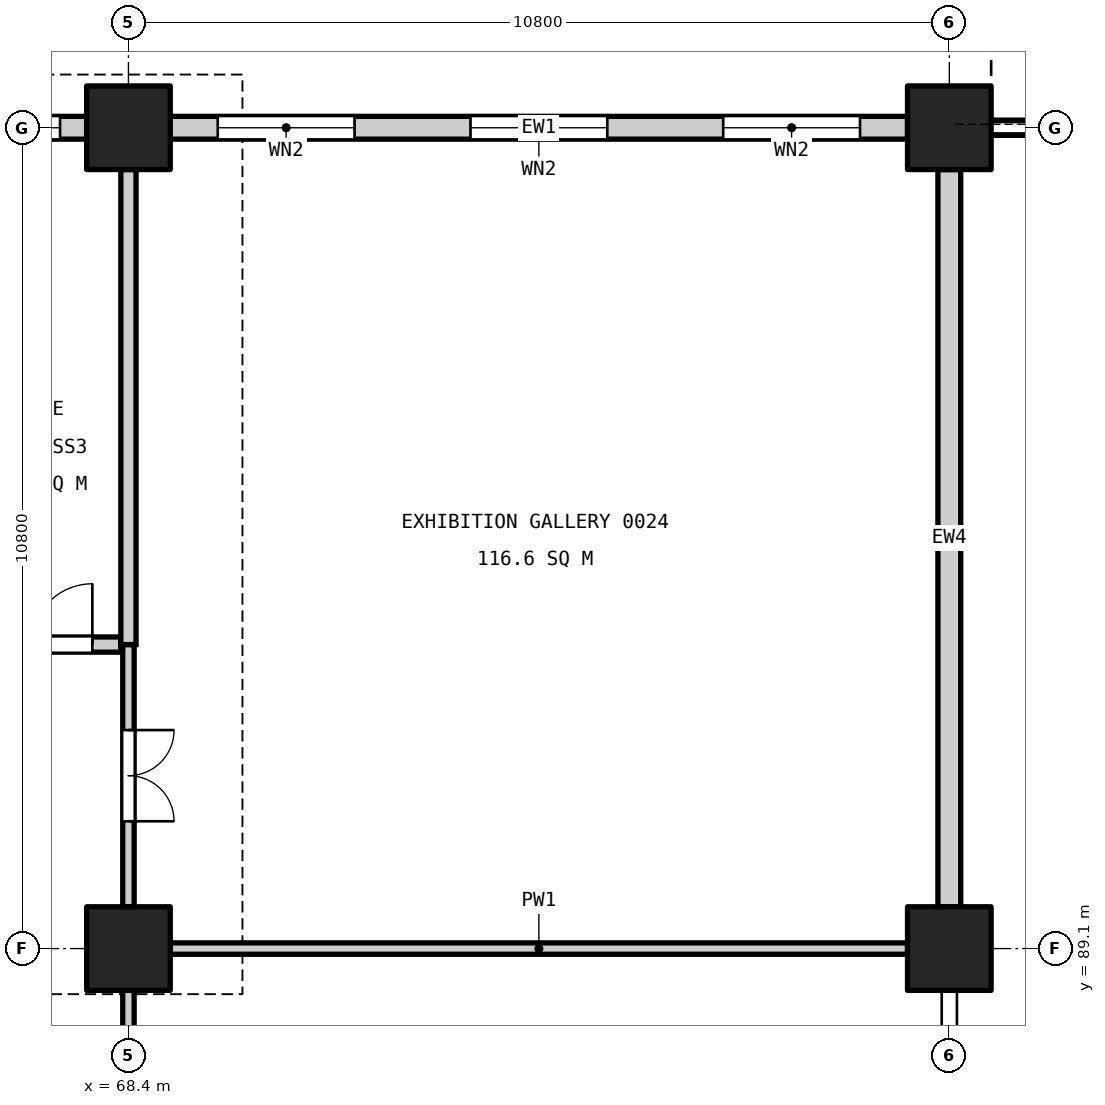
"""IFC4 building model, lengths in metres.
Left out: names, types, materials, properties, quantities, classifications, styles, units other than length and angle.
Written with IfcOpenShell. Run it as: python <this file> out.ifc"""

import sys

from ifc_helpers import new_model, si_unit, direction, frame, frame_2d, origin, origin_2d, place, context, subcontext, project, spatial, rectangle, extrude, element, fill, save


model = new_model("IFC4")
c1 = context("Model", 3, precision=1e-05, world=origin(), true_north=direction((0.0, 1.0)))
c2 = subcontext(c1, "Body", "Model", "MODEL_VIEW")
j1 = project(units=[si_unit("LENGTHUNIT", "METRE"), si_unit("PLANEANGLEUNIT", "RADIAN")], contexts=[c1])
p1 = place(None, origin())
s1 = spatial("IfcSite", under=j1, at=p1, CompositionType="ELEMENT")
p2 = place(p1, origin())
s2 = spatial("IfcBuilding", under=s1, at=p2, CompositionType="ELEMENT")
p3 = place(p2, origin())
s3 = spatial("IfcBuildingStorey", under=s2, at=p3, CompositionType="ELEMENT", Elevation=0.0)
for number, where, z_axis, x_axis in (
    (1, (68.4, 89.1, 0.0), (0.0, 0.0, 1.0), (1.0, 0.0, 0.0)),
    (2, (68.4, 99.9, 0.0), (0.0, 0.0, 1.0), (1.0, 0.0, 0.0)),
    (3, (79.2, 89.1, 0.0), (0.0, 0.0, 1.0), (1.0, 0.0, 0.0)),
    (4, (79.2, 99.9, 0.0), (0.0, 0.0, 1.0), (1.0, 0.0, 0.0)),
):
    element("IfcColumn", number, at=place(p3, frame(where, z_axis=z_axis, x_axis=x_axis)), inside=s3, PredefinedType="COLUMN", context=c2, shape_type="SweptSolid", body=[
        extrude(rectangle(XDim=1.1, YDim=1.1, at=origin_2d()), origin(), (0.0, 0.0, 1.0), 6.0),
    ])
p4 = place(p3, frame((79.75, 99.9, 0.0), z_axis=(0.0, 0.0, 1.0), x_axis=(1.0, 0.0, 0.0)))
e5 = element("IfcWall", 5, at=p4, inside=s3, PredefinedType="SOLIDWALL", context=c2, shape_type="SweptSolid", body=[
    extrude(rectangle(XDim=20.5, YDim=0.2, at=frame_2d((10.25, 0.0))), origin(), (0.0, 0.0, 1.0), 2.6),
])
p5 = place(p4, frame((0.608, 0.0, 0.0)))
e6 = element("IfcOpeningElement", 6, at=p5, cuts=e5, PredefinedType="OPENING", context=c2, shape_type="SweptSolid", body=[
    extrude(rectangle(XDim=2.2, YDim=2.4, at=frame_2d((1.1, 1.2))), frame((0.0, 0.11, 0.0), z_axis=(0.0, -1.0, 0.0), x_axis=(1.0, 0.0, 0.0)), (0.0, 0.0, 1.0), 0.22),
])
p6 = place(p4, frame((4.025, 0.0, 0.0)))
e7 = element("IfcOpeningElement", 7, at=p6, cuts=e5, PredefinedType="OPENING", context=c2, shape_type="SweptSolid", body=[
    extrude(rectangle(XDim=2.2, YDim=2.4, at=frame_2d((1.1, 1.2))), frame((0.0, 0.11, 0.0), z_axis=(0.0, -1.0, 0.0), x_axis=(1.0, 0.0, 0.0)), (0.0, 0.0, 1.0), 0.22),
])
p7 = place(p4, frame((7.442, 0.0, 0.0)))
e8 = element("IfcOpeningElement", 8, at=p7, cuts=e5, PredefinedType="OPENING", context=c2, shape_type="SweptSolid", body=[
    extrude(rectangle(XDim=2.2, YDim=2.4, at=frame_2d((1.1, 1.2))), frame((0.0, 0.11, 0.0), z_axis=(0.0, -1.0, 0.0), x_axis=(1.0, 0.0, 0.0)), (0.0, 0.0, 1.0), 0.22),
])
p8 = place(p4, frame((10.858, 0.0, 0.0)))
e9 = element("IfcOpeningElement", 9, at=p8, cuts=e5, PredefinedType="OPENING", context=c2, shape_type="SweptSolid", body=[
    extrude(rectangle(XDim=2.2, YDim=2.4, at=frame_2d((1.1, 1.2))), frame((0.0, 0.11, 0.0), z_axis=(0.0, -1.0, 0.0), x_axis=(1.0, 0.0, 0.0)), (0.0, 0.0, 1.0), 0.22),
])
p9 = place(p4, frame((14.275, 0.0, 0.0)))
e10 = element("IfcOpeningElement", 10, at=p9, cuts=e5, PredefinedType="OPENING", context=c2, shape_type="SweptSolid", body=[
    extrude(rectangle(XDim=2.2, YDim=2.4, at=frame_2d((1.1, 1.2))), frame((0.0, 0.11, 0.0), z_axis=(0.0, -1.0, 0.0), x_axis=(1.0, 0.0, 0.0)), (0.0, 0.0, 1.0), 0.22),
])
p10 = place(p4, frame((17.692, 0.0, 0.0)))
e11 = element("IfcOpeningElement", 11, at=p10, cuts=e5, PredefinedType="OPENING", context=c2, shape_type="SweptSolid", body=[
    extrude(rectangle(XDim=2.2, YDim=2.4, at=frame_2d((1.1, 1.2))), frame((0.0, 0.11, 0.0), z_axis=(0.0, -1.0, 0.0), x_axis=(1.0, 0.0, 0.0)), (0.0, 0.0, 1.0), 0.22),
])
p11 = place(p3, frame((65.95, 99.9, 0.0), z_axis=(0.0, 0.0, 1.0), x_axis=(1.0, 0.0, 0.0)))
e12 = element("IfcWall", 12, at=p11, inside=s3, PredefinedType="STANDARD", context=c2, shape_type="SweptSolid", body=[
    extrude(rectangle(XDim=1.9, YDim=0.3, at=frame_2d((0.95, 0.0))), origin(), (0.0, 0.0, 1.0), 4.9),
])
p12 = place(p11, frame((0.35, 0.0, 0.9)))
e13 = element("IfcOpeningElement", 13, at=p12, cuts=e12, PredefinedType="OPENING", context=c2, shape_type="SweptSolid", body=[
    extrude(rectangle(XDim=1.2, YDim=2.4, at=frame_2d((0.6, 1.2))), frame((0.0, 0.16, 0.0), z_axis=(0.0, -1.0, 0.0), x_axis=(1.0, 0.0, 0.0)), (0.0, 0.0, 1.0), 0.32),
])
p13 = place(p3, frame((68.95, 99.9, 0.0), z_axis=(0.0, 0.0, 1.0), x_axis=(1.0, 0.0, 0.0)))
e14 = element("IfcWall", 14, at=p13, inside=s3, PredefinedType="STANDARD", context=c2, shape_type="SweptSolid", body=[
    extrude(rectangle(XDim=9.7, YDim=0.3, at=frame_2d((4.85, 0.0))), origin(), (0.0, 0.0, 1.0), 4.9),
])
p14 = place(p13, frame((0.625, 0.0, 0.9)))
e15 = element("IfcOpeningElement", 15, at=p14, cuts=e14, PredefinedType="OPENING", context=c2, shape_type="SweptSolid", body=[
    extrude(rectangle(XDim=1.8, YDim=3.0, at=frame_2d((0.9, 1.5))), frame((0.0, 0.16, 0.0), z_axis=(0.0, -1.0, 0.0), x_axis=(1.0, 0.0, 0.0)), (0.0, 0.0, 1.0), 0.32),
])
p15 = place(p13, frame((3.95, 0.0, 0.9)))
e16 = element("IfcOpeningElement", 16, at=p15, cuts=e14, PredefinedType="OPENING", context=c2, shape_type="SweptSolid", body=[
    extrude(rectangle(XDim=1.8, YDim=3.0, at=frame_2d((0.9, 1.5))), frame((0.0, 0.16, 0.0), z_axis=(0.0, -1.0, 0.0), x_axis=(1.0, 0.0, 0.0)), (0.0, 0.0, 1.0), 0.32),
])
p16 = place(p13, frame((7.275, 0.0, 0.9)))
e17 = element("IfcOpeningElement", 17, at=p16, cuts=e14, PredefinedType="OPENING", context=c2, shape_type="SweptSolid", body=[
    extrude(rectangle(XDim=1.8, YDim=3.0, at=frame_2d((0.9, 1.5))), frame((0.0, 0.16, 0.0), z_axis=(0.0, -1.0, 0.0), x_axis=(1.0, 0.0, 0.0)), (0.0, 0.0, 1.0), 0.32),
])
p17 = place(p3, frame((79.2, 89.65, 0.0), z_axis=(0.0, 0.0, 1.0), x_axis=(0.0, 1.0, 0.0)))
e18 = element("IfcWall", 18, at=p17, inside=s3, PredefinedType="STANDARD", context=c2, shape_type="SweptSolid", body=[
    extrude(rectangle(XDim=9.7, YDim=0.3, at=frame_2d((4.85, 0.0))), origin(), (0.0, 0.0, 1.0), 4.6),
])
p18 = place(p3, frame((65.95, 93.1, 0.0), z_axis=(0.0, 0.0, 1.0), x_axis=(1.0, 0.0, 0.0)))
e19 = element("IfcWall", 19, at=p18, inside=s3, PredefinedType="PARTITIONING", context=c2, shape_type="SweptSolid", body=[
    extrude(rectangle(XDim=2.35, YDim=0.2, at=frame_2d((1.175, 0.0))), origin(), (0.0, 0.0, 1.0), 4.6),
])
p19 = place(p18, frame((0.375, 0.0, 0.0)))
e20 = element("IfcOpeningElement", 20, at=p19, cuts=e19, PredefinedType="OPENING", context=c2, shape_type="SweptSolid", body=[
    extrude(rectangle(XDim=1.6, YDim=2.1, at=frame_2d((0.8, 1.05))), frame((0.0, 0.11, 0.0), z_axis=(0.0, -1.0, 0.0), x_axis=(1.0, 0.0, 0.0)), (0.0, 0.0, 1.0), 0.22),
])
p20 = place(p3, frame((68.4, 78.85, 0.0), z_axis=(0.0, 0.0, 1.0), x_axis=(0.0, 1.0, 0.0)))
e21 = element("IfcWall", 21, at=p20, inside=s3, PredefinedType="PARTITIONING", context=c2, shape_type="SweptSolid", body=[
    extrude(rectangle(XDim=9.7, YDim=0.15, at=frame_2d((4.85, 0.0))), origin(), (0.0, 0.0, 1.0), 4.6),
])
p21 = place(p20, frame((0.925, 0.0, 0.0)))
e22 = element("IfcOpeningElement", 22, at=p21, cuts=e21, PredefinedType="OPENING", context=c2, shape_type="SweptSolid", body=[
    extrude(rectangle(XDim=1.2, YDim=2.1, at=frame_2d((0.6, 1.05))), frame((0.0, 0.085, 0.0), z_axis=(0.0, -1.0, 0.0), x_axis=(1.0, 0.0, 0.0)), (0.0, 0.0, 1.0), 0.17),
])
p22 = place(p20, frame((7.575, 0.0, 0.0)))
e23 = element("IfcOpeningElement", 23, at=p22, cuts=e21, PredefinedType="OPENING", context=c2, shape_type="SweptSolid", body=[
    extrude(rectangle(XDim=1.2, YDim=2.1, at=frame_2d((0.6, 1.05))), frame((0.0, 0.085, 0.0), z_axis=(0.0, -1.0, 0.0), x_axis=(1.0, 0.0, 0.0)), (0.0, 0.0, 1.0), 0.17),
])
p23 = place(p20, frame((4.25, 0.0, 0.0)))
e24 = element("IfcOpeningElement", 24, at=p23, cuts=e21, PredefinedType="OPENING", context=c2, shape_type="SweptSolid", body=[
    extrude(rectangle(XDim=1.2, YDim=2.1, at=frame_2d((0.6, 1.05))), frame((0.0, 0.085, 0.0), z_axis=(0.0, -1.0, 0.0), x_axis=(1.0, 0.0, 0.0)), (0.0, 0.0, 1.0), 0.17),
])
p24 = place(p3, frame((68.4, 89.65, 0.0), z_axis=(0.0, 0.0, 1.0), x_axis=(0.0, 1.0, 0.0)))
e25 = element("IfcWall", 25, at=p24, inside=s3, PredefinedType="PARTITIONING", context=c2, shape_type="SweptSolid", body=[
    extrude(rectangle(XDim=3.45, YDim=0.15, at=frame_2d((1.725, 0.0))), origin(), (0.0, 0.0, 1.0), 4.6),
])
p25 = place(p24, frame((1.125, 0.0, 0.0)))
e26 = element("IfcOpeningElement", 26, at=p25, cuts=e25, PredefinedType="OPENING", context=c2, shape_type="SweptSolid", body=[
    extrude(rectangle(XDim=1.2, YDim=2.1, at=frame_2d((0.6, 1.05))), frame((0.0, 0.085, 0.0), z_axis=(0.0, -1.0, 0.0), x_axis=(1.0, 0.0, 0.0)), (0.0, 0.0, 1.0), 0.17),
])
p26 = place(p3, frame((68.4, 93.1, 0.0), z_axis=(0.0, 0.0, 1.0), x_axis=(0.0, 1.0, 0.0)))
e27 = element("IfcWall", 27, at=p26, inside=s3, PredefinedType="PARTITIONING", context=c2, shape_type="SweptSolid", body=[
    extrude(rectangle(XDim=6.25, YDim=0.2, at=frame_2d((3.125, 0.0))), origin(), (0.0, 0.0, 1.0), 4.6),
])
p27 = place(p3, frame((68.95, 89.1, 0.0), z_axis=(0.0, 0.0, 1.0), x_axis=(1.0, 0.0, 0.0)))
e28 = element("IfcWall", 28, at=p27, inside=s3, PredefinedType="PARTITIONING", context=c2, shape_type="SweptSolid", body=[
    extrude(rectangle(XDim=9.7, YDim=0.15, at=frame_2d((4.85, 0.0))), origin(), (0.0, 0.0, 1.0), 4.9),
])
p28 = place(p12, origin())
e29 = element("IfcWindow", 29, at=p28, inside=s3, PartitioningType="SINGLE_PANEL", PredefinedType="WINDOW", context=c2, shape_type="SweptSolid", body=[
    extrude(rectangle(XDim=1.2, YDim=2.4, at=frame_2d((0.6, 1.2))), frame((0.0, 0.03, 0.0), z_axis=(0.0, -1.0, 0.0), x_axis=(1.0, 0.0, 0.0)), (0.0, 0.0, 1.0), 0.06),
])
fill(e13, e29)
p29 = place(p14, origin())
e30 = element("IfcWindow", 30, at=p29, inside=s3, PartitioningType="SINGLE_PANEL", PredefinedType="WINDOW", context=c2, shape_type="SweptSolid", body=[
    extrude(rectangle(XDim=1.8, YDim=3.0, at=frame_2d((0.9, 1.5))), frame((0.0, 0.03, 0.0), z_axis=(0.0, -1.0, 0.0), x_axis=(1.0, 0.0, 0.0)), (0.0, 0.0, 1.0), 0.06),
])
fill(e15, e30)
p30 = place(p15, origin())
e31 = element("IfcWindow", 31, at=p30, inside=s3, PartitioningType="SINGLE_PANEL", PredefinedType="WINDOW", context=c2, shape_type="SweptSolid", body=[
    extrude(rectangle(XDim=1.8, YDim=3.0, at=frame_2d((0.9, 1.5))), frame((0.0, 0.03, 0.0), z_axis=(0.0, -1.0, 0.0), x_axis=(1.0, 0.0, 0.0)), (0.0, 0.0, 1.0), 0.06),
])
fill(e16, e31)
p31 = place(p16, origin())
e32 = element("IfcWindow", 32, at=p31, inside=s3, PartitioningType="SINGLE_PANEL", PredefinedType="WINDOW", context=c2, shape_type="SweptSolid", body=[
    extrude(rectangle(XDim=1.8, YDim=3.0, at=frame_2d((0.9, 1.5))), frame((0.0, 0.03, 0.0), z_axis=(0.0, -1.0, 0.0), x_axis=(1.0, 0.0, 0.0)), (0.0, 0.0, 1.0), 0.06),
])
fill(e17, e32)
p32 = place(p25, frame((1.2, 0.0, 0.0), z_axis=(0.0, 0.0, 1.0), x_axis=(-1.0, 0.0, 0.0)))
e33 = element("IfcDoor", 33, at=p32, inside=s3, OperationType="DOUBLE_DOOR_SINGLE_SWING", PredefinedType="DOOR", context=c2, shape_type="SweptSolid", body=[
    extrude(rectangle(XDim=1.2, YDim=2.1, at=frame_2d((0.6, 1.05))), frame((0.0, 0.025, 0.0), z_axis=(0.0, -1.0, 0.0), x_axis=(1.0, 0.0, 0.0)), (0.0, 0.0, 1.0), 0.05),
])
fill(e26, e33)
p33 = place(p19, origin())
e34 = element("IfcDoor", 34, at=p33, inside=s3, OperationType="DOUBLE_DOOR_SINGLE_SWING", PredefinedType="DOOR", context=c2, shape_type="SweptSolid", body=[
    extrude(rectangle(XDim=1.6, YDim=2.1, at=frame_2d((0.8, 1.05))), frame((0.0, 0.025, 0.0), z_axis=(0.0, -1.0, 0.0), x_axis=(1.0, 0.0, 0.0)), (0.0, 0.0, 1.0), 0.05),
])
fill(e20, e34)
save(model, sys.argv[1])
